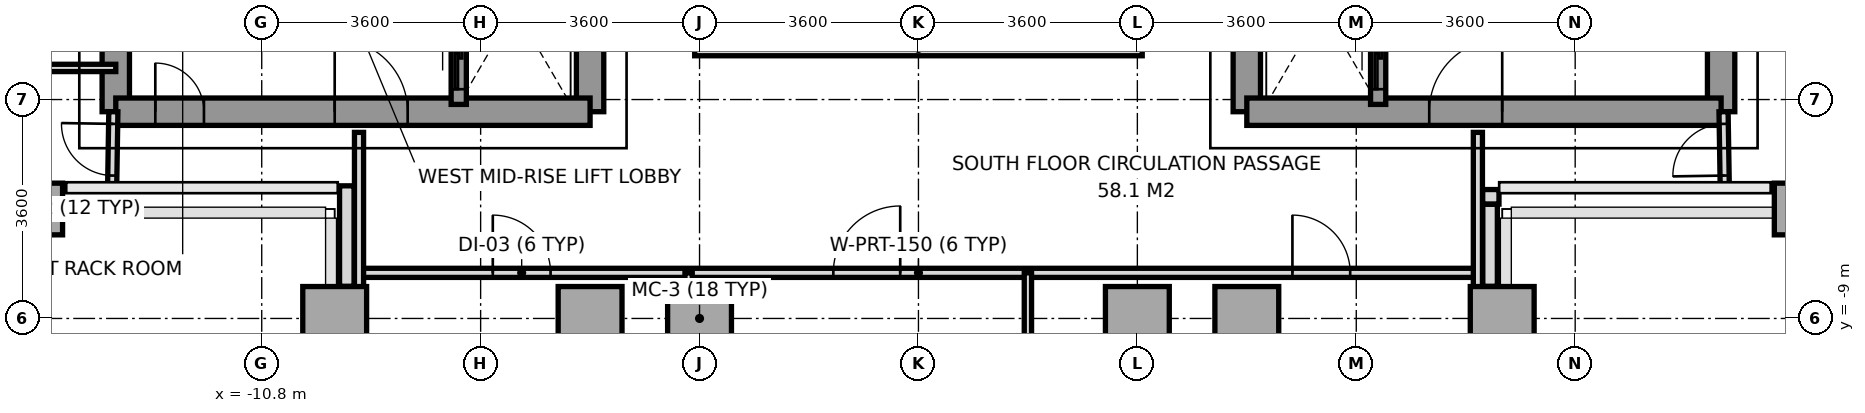
"""IFC4 building model, lengths in metres.
Left out: names, types, materials, properties, quantities, classifications, styles, units other than length and angle.
Written with IfcOpenShell. Run it as: python <this file> out.ifc"""

import sys

from ifc_helpers import new_model, si_unit, direction, frame, frame_2d, origin, origin_2d, place, context, subcontext, project, spatial, rectangle, extrude, source, transform, mapped, element, fill, save


model = new_model("IFC4")
c1 = context("Model", 3, precision=1e-05, world=origin(), true_north=direction((0.0, 1.0)))
c2 = subcontext(c1, "Body", "Model", "MODEL_VIEW")
j1 = project(units=[si_unit("LENGTHUNIT", "METRE"), si_unit("PLANEANGLEUNIT", "RADIAN")], contexts=[c1])
p1 = place(None, origin())
s1 = spatial("IfcSite", under=j1, at=p1, CompositionType="ELEMENT")
p2 = place(p1, origin())
s2 = spatial("IfcBuilding", under=s1, at=p2, CompositionType="ELEMENT")
p3 = place(p2, frame((0.0, 0.0, 144.8)))
s3 = spatial("IfcBuildingStorey", under=s2, at=p3, CompositionType="ELEMENT", Elevation=144.8)
m1 = source(origin(), c2, "Body", "SweptSolid", [
    extrude(rectangle(XDim=0.65, YDim=0.85, at=origin_2d()), origin(), (0.0, 0.0, 1.0), 3.2),
])
p4 = place(p3, frame((-14.4, -7.2, 0.0), z_axis=(0.0, 0.0, 1.0), x_axis=(1.0, 0.0, 0.0)))
e1 = element("IfcColumn", 1, at=p4, inside=s3, PredefinedType="COLUMN", context=c2, shape_type="MappedRepresentation", body=[
    mapped(m1, transform((0.0, 0.0, 0.0), x_axis=(1.0, 0.0, 0.0), y_axis=(0.0, 1.0, 0.0), z_axis=(0.0, 0.0, 1.0), scale=1.0)),
])
m2 = source(origin(), c2, "Body", "SweptSolid", [
    extrude(rectangle(XDim=1.05, YDim=1.05, at=origin_2d()), origin(), (0.0, 0.0, 1.0), 3.2),
])
for number, where, z_axis, x_axis in (
    (2, (-9.6, -9.0, 0.0), (0.0, 0.0, 1.0), (1.0, 0.0, 0.0)),
    (3, (-5.4, -9.0, 0.0), (0.0, 0.0, 1.0), (1.0, 0.0, 0.0)),
    (4, (-3.6, -9.0, 0.0), (0.0, 0.0, 1.0), (1.0, 0.0, 0.0)),
    (5, (3.6, -9.0, 0.0), (0.0, 0.0, 1.0), (1.0, 0.0, 0.0)),
    (6, (5.4, -9.0, 0.0), (0.0, 0.0, 1.0), (1.0, 0.0, 0.0)),
    (7, (9.6, -9.0, 0.0), (0.0, 0.0, 1.0), (1.0, 0.0, 0.0)),
):
    element("IfcColumn", number, at=place(p3, frame(where, z_axis=z_axis, x_axis=x_axis)), inside=s3, PredefinedType="COLUMN", context=c2, shape_type="MappedRepresentation", body=[
        mapped(m2, transform((0.0, 0.0, 0.0), x_axis=(1.0, 0.0, 0.0), y_axis=(0.0, 1.0, 0.0), z_axis=(0.0, 0.0, 1.0), scale=1.0)),
    ])
p5 = place(p3, frame((14.4, -7.2, 0.0), z_axis=(0.0, 0.0, 1.0), x_axis=(1.0, 0.0, 0.0)))
e8 = element("IfcColumn", 8, at=p5, inside=s3, PredefinedType="COLUMN", context=c2, shape_type="MappedRepresentation", body=[
    mapped(m1, transform((0.0, 0.0, 0.0), x_axis=(1.0, 0.0, 0.0), y_axis=(0.0, 1.0, 0.0), z_axis=(0.0, 0.0, 1.0), scale=1.0)),
])
p6 = place(p3, frame((9.547, -7.0, 0.0), z_axis=(0.0, 0.0, 1.0), x_axis=(-1.0, 0.0, 0.0)))
e9 = element("IfcWall", 9, at=p6, inside=s3, PredefinedType="PARAPET", context=c2, shape_type="SweptSolid", body=[
    extrude(rectangle(XDim=0.269, YDim=0.24, at=frame_2d((0.135, 0.0))), origin(), (0.0, 0.0, 1.0), 1.15),
])
p7 = place(p3, frame((9.4, -7.123, 0.0), z_axis=(0.0, 0.0, 1.0), x_axis=(0.0, -1.0, 0.0)))
e10 = element("IfcWall", 10, at=p7, inside=s3, PredefinedType="PARAPET", context=c2, shape_type="SweptSolid", body=[
    extrude(rectangle(XDim=1.349, YDim=0.24, at=frame_2d((0.674, 0.0))), origin(), (0.0, 0.0, 1.0), 1.15),
])
p8 = place(p3, frame((-9.4, -8.472, 0.0), z_axis=(0.0, 0.0, 1.0), x_axis=(0.0, 1.0, 0.0)))
e11 = element("IfcWall", 11, at=p8, inside=s3, PredefinedType="PARAPET", context=c2, shape_type="SweptSolid", body=[
    extrude(rectangle(XDim=1.653, YDim=0.24, at=frame_2d((0.827, 0.0))), origin(), (0.0, 0.0, 1.0), 1.15),
])
p9 = place(p3, frame((-13.2, -5.6, 0.0), z_axis=(0.0, 0.0, 1.0), x_axis=(0.0, 1.0, 0.0)))
e12 = element("IfcWall", 12, at=p9, inside=s3, PredefinedType="SHEAR", context=c2, shape_type="SweptSolid", body=[
    extrude(rectangle(XDim=11.2, YDim=0.45, at=frame_2d((5.6, 0.0))), origin(), (0.0, 0.0, 1.0), 3.2),
])
p10 = place(p3, frame((-5.4, -5.6, 0.0), z_axis=(0.0, 0.0, 1.0), x_axis=(0.0, 1.0, 0.0)))
e13 = element("IfcWall", 13, at=p10, inside=s3, PredefinedType="SHEAR", context=c2, shape_type="SweptSolid", body=[
    extrude(rectangle(XDim=12.5, YDim=0.45, at=frame_2d((6.25, 0.0))), origin(), (0.0, 0.0, 1.0), 3.2),
])
p11 = place(p10, frame((4.55, 0.0, 0.0)))
e14 = element("IfcOpeningElement", 14, at=p11, cuts=e13, PredefinedType="OPENING", context=c2, shape_type="SweptSolid", body=[
    extrude(rectangle(XDim=1.2, YDim=2.2, at=frame_2d((0.6, 1.1))), frame((0.0, 0.235, 0.0), z_axis=(0.0, -1.0, 0.0), x_axis=(1.0, 0.0, 0.0)), (0.0, 0.0, 1.0), 0.47),
])
p12 = place(p10, frame((6.86, 0.0, 0.0)))
e15 = element("IfcOpeningElement", 15, at=p12, cuts=e13, PredefinedType="OPENING", context=c2, shape_type="SweptSolid", body=[
    extrude(rectangle(XDim=0.8, YDim=2.1, at=frame_2d((0.4, 1.05))), frame((0.0, 0.235, 0.0), z_axis=(0.0, -1.0, 0.0), x_axis=(1.0, 0.0, 0.0)), (0.0, 0.0, 1.0), 0.47),
])
p13 = place(p3, frame((-13.2, -5.6, 0.0), z_axis=(0.0, 0.0, 1.0), x_axis=(1.0, 0.0, 0.0)))
e16 = element("IfcWall", 16, at=p13, inside=s3, PredefinedType="SHEAR", context=c2, shape_type="SweptSolid", body=[
    extrude(rectangle(XDim=7.8, YDim=0.45, at=frame_2d((3.9, 0.0))), origin(), (0.0, 0.0, 1.0), 3.2),
])
p14 = place(p13, frame((3.6, 0.0, 0.0)))
e17 = element("IfcOpeningElement", 17, at=p14, cuts=e16, PredefinedType="OPENING", context=c2, shape_type="SweptSolid", body=[
    extrude(rectangle(XDim=1.2, YDim=2.2, at=frame_2d((0.6, 1.1))), frame((0.0, 0.235, 0.0), z_axis=(0.0, -1.0, 0.0), x_axis=(1.0, 0.0, 0.0)), (0.0, 0.0, 1.0), 0.47),
])
p15 = place(p13, frame((0.65, 0.0, 0.0)))
e18 = element("IfcOpeningElement", 18, at=p15, cuts=e16, PredefinedType="OPENING", context=c2, shape_type="SweptSolid", body=[
    extrude(rectangle(XDim=0.8, YDim=2.1, at=frame_2d((0.4, 1.05))), frame((0.0, 0.235, 0.0), z_axis=(0.0, -1.0, 0.0), x_axis=(1.0, 0.0, 0.0)), (0.0, 0.0, 1.0), 0.47),
])
p16 = place(p3, frame((13.2, -5.6, 0.0), z_axis=(0.0, 0.0, 1.0), x_axis=(0.0, 1.0, 0.0)))
e19 = element("IfcWall", 19, at=p16, inside=s3, PredefinedType="SHEAR", context=c2, shape_type="SweptSolid", body=[
    extrude(rectangle(XDim=11.2, YDim=0.45, at=frame_2d((5.6, 0.0))), origin(), (0.0, 0.0, 1.0), 3.2),
])
p17 = place(p3, frame((5.4, -5.6, 0.0), z_axis=(0.0, 0.0, 1.0), x_axis=(0.0, 1.0, 0.0)))
e20 = element("IfcWall", 20, at=p17, inside=s3, PredefinedType="SHEAR", context=c2, shape_type="SweptSolid", body=[
    extrude(rectangle(XDim=12.5, YDim=0.45, at=frame_2d((6.25, 0.0))), origin(), (0.0, 0.0, 1.0), 3.2),
])
p18 = place(p17, frame((4.55, 0.0, 0.0)))
e21 = element("IfcOpeningElement", 21, at=p18, cuts=e20, PredefinedType="OPENING", context=c2, shape_type="SweptSolid", body=[
    extrude(rectangle(XDim=1.2, YDim=2.2, at=frame_2d((0.6, 1.1))), frame((0.0, 0.235, 0.0), z_axis=(0.0, -1.0, 0.0), x_axis=(1.0, 0.0, 0.0)), (0.0, 0.0, 1.0), 0.47),
])
p19 = place(p17, frame((6.86, 0.0, 0.0)))
e22 = element("IfcOpeningElement", 22, at=p19, cuts=e20, PredefinedType="OPENING", context=c2, shape_type="SweptSolid", body=[
    extrude(rectangle(XDim=0.8, YDim=2.1, at=frame_2d((0.4, 1.05))), frame((0.0, 0.235, 0.0), z_axis=(0.0, -1.0, 0.0), x_axis=(1.0, 0.0, 0.0)), (0.0, 0.0, 1.0), 0.47),
])
p20 = place(p3, frame((5.4, -5.6, 0.0), z_axis=(0.0, 0.0, 1.0), x_axis=(1.0, 0.0, 0.0)))
e23 = element("IfcWall", 23, at=p20, inside=s3, PredefinedType="SHEAR", context=c2, shape_type="SweptSolid", body=[
    extrude(rectangle(XDim=7.8, YDim=0.45, at=frame_2d((3.9, 0.0))), origin(), (0.0, 0.0, 1.0), 3.2),
])
p21 = place(p20, frame((3.0, 0.0, 0.0)))
e24 = element("IfcOpeningElement", 24, at=p21, cuts=e23, PredefinedType="OPENING", context=c2, shape_type="SweptSolid", body=[
    extrude(rectangle(XDim=1.2, YDim=2.2, at=frame_2d((0.6, 1.1))), frame((0.0, 0.235, 0.0), z_axis=(0.0, -1.0, 0.0), x_axis=(1.0, 0.0, 0.0)), (0.0, 0.0, 1.0), 0.47),
])
p22 = place(p3, frame((-7.56, -5.48, 0.0), z_axis=(0.0, 0.0, 1.0), x_axis=(0.0, 1.0, 0.0)))
e25 = element("IfcWall", 25, at=p22, inside=s3, PredefinedType="SOLIDWALL", context=c2, shape_type="SweptSolid", body=[
    extrude(rectangle(XDim=1.6, YDim=0.25, at=frame_2d((0.8, 0.0))), origin(), (0.0, 0.0, 1.0), 3.2),
])
p23 = place(p22, frame((0.25, 0.0, 0.0)))
e26 = element("IfcOpeningElement", 26, at=p23, cuts=e25, PredefinedType="OPENING", context=c2, shape_type="SweptSolid", body=[
    extrude(rectangle(XDim=1.1, YDim=2.2, at=frame_2d((0.55, 1.1))), frame((0.0, 0.135, 0.0), z_axis=(0.0, -1.0, 0.0), x_axis=(1.0, 0.0, 0.0)), (0.0, 0.0, 1.0), 0.27),
])
p24 = place(p3, frame((7.56, -5.48, 0.0), z_axis=(0.0, 0.0, 1.0), x_axis=(0.0, 1.0, 0.0)))
e27 = element("IfcWall", 27, at=p24, inside=s3, PredefinedType="SOLIDWALL", context=c2, shape_type="SweptSolid", body=[
    extrude(rectangle(XDim=1.6, YDim=0.25, at=frame_2d((0.8, 0.0))), origin(), (0.0, 0.0, 1.0), 3.2),
])
p25 = place(p24, frame((0.25, 0.0, 0.0)))
e28 = element("IfcOpeningElement", 28, at=p25, cuts=e27, PredefinedType="OPENING", context=c2, shape_type="SweptSolid", body=[
    extrude(rectangle(XDim=1.1, YDim=2.2, at=frame_2d((0.55, 1.1))), frame((0.0, 0.135, 0.0), z_axis=(0.0, -1.0, 0.0), x_axis=(1.0, 0.0, 0.0)), (0.0, 0.0, 1.0), 0.27),
])
p26 = place(p3, frame((-9.2, -8.25, 0.0), z_axis=(0.0, 0.0, 1.0), x_axis=(1.0, 0.0, 0.0)))
e29 = element("IfcWall", 29, at=p26, inside=s3, PredefinedType="PARTITIONING", context=c2, shape_type="SweptSolid", body=[
    extrude(rectangle(XDim=18.4, YDim=0.15, at=frame_2d((9.2, 0.0))), origin(), (0.0, 0.0, 1.0), 2.76),
])
p27 = place(p26, frame((2.2, 0.0, 0.0)))
e30 = element("IfcOpeningElement", 30, at=p27, cuts=e29, PredefinedType="OPENING", context=c2, shape_type="SweptSolid", body=[
    extrude(rectangle(XDim=0.95, YDim=2.15, at=frame_2d((0.475, 1.075))), frame((0.0, 0.085, 0.0), z_axis=(0.0, -1.0, 0.0), x_axis=(1.0, 0.0, 0.0)), (0.0, 0.0, 1.0), 0.17),
])
p28 = place(p26, frame((7.8, 0.0, 0.0)))
e31 = element("IfcOpeningElement", 31, at=p28, cuts=e29, PredefinedType="OPENING", context=c2, shape_type="SweptSolid", body=[
    extrude(rectangle(XDim=1.1, YDim=2.2, at=frame_2d((0.55, 1.1))), frame((0.0, 0.085, 0.0), z_axis=(0.0, -1.0, 0.0), x_axis=(1.0, 0.0, 0.0)), (0.0, 0.0, 1.0), 0.17),
])
p29 = place(p26, frame((15.35, 0.0, 0.0)))
e32 = element("IfcOpeningElement", 32, at=p29, cuts=e29, PredefinedType="OPENING", context=c2, shape_type="SweptSolid", body=[
    extrude(rectangle(XDim=0.95, YDim=2.15, at=frame_2d((0.475, 1.075))), frame((0.0, 0.085, 0.0), z_axis=(0.0, -1.0, 0.0), x_axis=(1.0, 0.0, 0.0)), (0.0, 0.0, 1.0), 0.17),
])
for number, where, z_axis, x_axis in (
    (33, (-9.2, -15.68, 0.0), (0.0, 0.0, 1.0), (0.0, 1.0, 0.0)),
    (34, (9.2, -15.68, 0.0), (0.0, 0.0, 1.0), (0.0, 1.0, 0.0)),
):
    element("IfcWall", number, at=place(p3, frame(where, z_axis=z_axis, x_axis=x_axis)), inside=s3, PredefinedType="PARTITIONING", context=c2, shape_type="SweptSolid", body=[
        extrude(rectangle(XDim=9.74, YDim=0.15, at=frame_2d((4.87, 0.0))), origin(), (0.0, 0.0, 1.0), 2.7),
    ])
for number, where, z_axis, x_axis in (
    (35, (-3.78, -24.65, 0.0), (0.0, 0.0, 1.0), (0.0, 1.0, 0.0)),
    (36, (1.8, -24.65, 0.0), (0.0, 0.0, 1.0), (0.0, 1.0, 0.0)),
):
    element("IfcWall", number, at=place(p3, frame(where, z_axis=z_axis, x_axis=x_axis)), inside=s3, PredefinedType="PARTITIONING", context=c2, shape_type="SweptSolid", body=[
        extrude(rectangle(XDim=16.4, YDim=0.12, at=frame_2d((8.2, 0.0))), origin(), (0.0, 0.0, 1.0), 2.7),
    ])
p30 = place(p3, frame((-13.26, -6.85, 0.0), z_axis=(0.0, 0.0, 1.0), x_axis=(0.016013571389, 0.999871774545, 0.0)))
e37 = element("IfcWall", 37, at=p30, inside=s3, PredefinedType="PARTITIONING", context=c2, shape_type="SweptSolid", body=[
    extrude(rectangle(XDim=1.25, YDim=0.15, at=frame_2d((0.625, 0.0))), origin(), (0.0, 0.0, 1.0), 3.2),
])
p31 = place(p30, frame((0.2, 0.0, 0.0)))
e38 = element("IfcOpeningElement", 38, at=p31, cuts=e37, PredefinedType="OPENING", context=c2, shape_type="SweptSolid", body=[
    extrude(rectangle(XDim=0.85, YDim=2.1, at=frame_2d((0.425, 1.05))), frame((0.0, 0.085, 0.0), z_axis=(0.0, -1.0, 0.0), x_axis=(1.0, 0.0, 0.0)), (0.0, 0.0, 1.0), 0.17),
])
p32 = place(p3, frame((-19.17, -4.88, 0.0), z_axis=(0.0, 0.0, 1.0), x_axis=(1.0, 0.0, 0.0)))
e39 = element("IfcWall", 39, at=p32, inside=s3, PredefinedType="PARTITIONING", context=c2, shape_type="SweptSolid", body=[
    extrude(rectangle(XDim=5.97, YDim=0.12, at=frame_2d((2.985, 0.0))), origin(), (0.0, 0.0, 1.0), 2.76),
])
p33 = place(p32, frame((1.45, 0.0, 0.0)))
e40 = element("IfcOpeningElement", 40, at=p33, cuts=e39, PredefinedType="OPENING", context=c2, shape_type="SweptSolid", body=[
    extrude(rectangle(XDim=0.95, YDim=2.15, at=frame_2d((0.475, 1.075))), frame((0.0, 0.07, 0.0), z_axis=(0.0, -1.0, 0.0), x_axis=(1.0, 0.0, 0.0)), (0.0, 0.0, 1.0), 0.14),
])
p34 = place(p3, frame((13.26, -6.85, 0.0), z_axis=(0.0, 0.0, 1.0), x_axis=(-0.016013571389, 0.999871774545, 0.0)))
e41 = element("IfcWall", 41, at=p34, inside=s3, PredefinedType="PARTITIONING", context=c2, shape_type="SweptSolid", body=[
    extrude(rectangle(XDim=1.25, YDim=0.15, at=frame_2d((0.625, 0.0))), origin(), (0.0, 0.0, 1.0), 3.2),
])
p35 = place(p34, frame((0.2, 0.0, 0.0)))
e42 = element("IfcOpeningElement", 42, at=p35, cuts=e41, PredefinedType="OPENING", context=c2, shape_type="SweptSolid", body=[
    extrude(rectangle(XDim=0.85, YDim=2.1, at=frame_2d((0.425, 1.05))), frame((0.0, 0.085, 0.0), z_axis=(0.0, -1.0, 0.0), x_axis=(1.0, 0.0, 0.0)), (0.0, 0.0, 1.0), 0.17),
])
p36 = place(p3, frame((-3.68, -4.56, 0.0), z_axis=(0.0, 0.0, 1.0), x_axis=(1.0, 0.0, 0.0)))
e43 = element("IfcWall", 43, at=p36, inside=s3, PredefinedType="PARAPET", context=c2, shape_type="SweptSolid", body=[
    extrude(rectangle(XDim=7.36, YDim=0.24, at=frame_2d((3.68, 0.0))), origin(), (0.0, 0.0, 1.0), 1.15),
])
m3 = source(origin(), c2, "Body", "SweptSolid", [
    extrude(rectangle(XDim=1.2, YDim=2.2, at=frame_2d((0.6, 1.1))), frame((0.0, 0.025, 0.0), z_axis=(0.0, -1.0, 0.0), x_axis=(1.0, 0.0, 0.0)), (0.0, 0.0, 1.0), 0.05),
])
p37 = place(p14, origin())
e44 = element("IfcDoor", 44, at=p37, inside=s3, OperationType="SINGLE_SWING_LEFT", PredefinedType="DOOR", context=c2, shape_type="MappedRepresentation", body=[
    mapped(m3, transform((0.0, 0.0, 0.0), x_axis=(1.0, 0.0, 0.0), y_axis=(0.0, 1.0, 0.0), z_axis=(0.0, 0.0, 1.0), scale=1.0)),
])
fill(e17, e44)
p38 = place(p21, origin())
e45 = element("IfcDoor", 45, at=p38, inside=s3, OperationType="SINGLE_SWING_RIGHT", PredefinedType="DOOR", context=c2, shape_type="MappedRepresentation", body=[
    mapped(m3, transform((0.0, 0.0, 0.0), x_axis=(1.0, 0.0, 0.0), y_axis=(0.0, 1.0, 0.0), z_axis=(0.0, 0.0, 1.0), scale=1.0)),
])
fill(e24, e45)
m4 = source(origin(), c2, "Body", "SweptSolid", [
    extrude(rectangle(XDim=0.8, YDim=2.1, at=frame_2d((0.4, 1.05))), frame((0.0, 0.025, 0.0), z_axis=(0.0, -1.0, 0.0), x_axis=(1.0, 0.0, 0.0)), (0.0, 0.0, 1.0), 0.05),
])
p39 = place(p15, origin())
e46 = element("IfcDoor", 46, at=p39, inside=s3, OperationType="SINGLE_SWING_LEFT", PredefinedType="DOOR", context=c2, shape_type="MappedRepresentation", body=[
    mapped(m4, transform((0.0, 0.0, 0.0), x_axis=(1.0, 0.0, 0.0), y_axis=(0.0, 1.0, 0.0), z_axis=(0.0, 0.0, 1.0), scale=1.0)),
])
fill(e18, e46)
m5 = source(origin(), c2, "Body", "SweptSolid", [
    extrude(rectangle(XDim=1.1, YDim=2.2, at=frame_2d((0.55, 1.1))), frame((0.0, 0.025, 0.0), z_axis=(0.0, -1.0, 0.0), x_axis=(1.0, 0.0, 0.0)), (0.0, 0.0, 1.0), 0.05),
])
p40 = place(p23, origin())
e47 = element("IfcDoor", 47, at=p40, inside=s3, OperationType="SLIDING_TO_LEFT", PredefinedType="DOOR", context=c2, shape_type="MappedRepresentation", body=[
    mapped(m5, transform((0.0, 0.0, 0.0), x_axis=(1.0, 0.0, 0.0), y_axis=(0.0, 1.0, 0.0), z_axis=(0.0, 0.0, 1.0), scale=1.0)),
])
fill(e26, e47)
p41 = place(p25, origin())
e48 = element("IfcDoor", 48, at=p41, inside=s3, OperationType="SLIDING_TO_LEFT", PredefinedType="DOOR", context=c2, shape_type="MappedRepresentation", body=[
    mapped(m5, transform((0.0, 0.0, 0.0), x_axis=(1.0, 0.0, 0.0), y_axis=(0.0, 1.0, 0.0), z_axis=(0.0, 0.0, 1.0), scale=1.0)),
])
fill(e28, e48)
m6 = source(origin(), c2, "Body", "SweptSolid", [
    extrude(rectangle(XDim=0.95, YDim=2.15, at=frame_2d((0.475, 1.075))), frame((0.0, 0.025, 0.0), z_axis=(0.0, -1.0, 0.0), x_axis=(1.0, 0.0, 0.0)), (0.0, 0.0, 1.0), 0.05),
])
p42 = place(p27, origin())
e49 = element("IfcDoor", 49, at=p42, inside=s3, OperationType="SINGLE_SWING_LEFT", PredefinedType="DOOR", context=c2, shape_type="MappedRepresentation", body=[
    mapped(m6, transform((0.0, 0.0, 0.0), x_axis=(1.0, 0.0, 0.0), y_axis=(0.0, 1.0, 0.0), z_axis=(0.0, 0.0, 1.0), scale=1.0)),
])
fill(e30, e49)
p43 = place(p28, origin())
e50 = element("IfcDoor", 50, at=p43, inside=s3, OperationType="SINGLE_SWING_RIGHT", PredefinedType="DOOR", context=c2, shape_type="MappedRepresentation", body=[
    mapped(m5, transform((0.0, 0.0, 0.0), x_axis=(1.0, 0.0, 0.0), y_axis=(0.0, 1.0, 0.0), z_axis=(0.0, 0.0, 1.0), scale=1.0)),
])
fill(e31, e50)
p44 = place(p29, origin())
e51 = element("IfcDoor", 51, at=p44, inside=s3, OperationType="SINGLE_SWING_LEFT", PredefinedType="DOOR", context=c2, shape_type="MappedRepresentation", body=[
    mapped(m6, transform((0.0, 0.0, 0.0), x_axis=(1.0, 0.0, 0.0), y_axis=(0.0, 1.0, 0.0), z_axis=(0.0, 0.0, 1.0), scale=1.0)),
])
fill(e32, e51)
m7 = source(origin(), c2, "Body", "SweptSolid", [
    extrude(rectangle(XDim=0.85, YDim=2.1, at=frame_2d((0.425, 1.05))), frame((0.0, 0.025, 0.0), z_axis=(0.0, -1.0, 0.0), x_axis=(1.0, 0.0, 0.0)), (0.0, 0.0, 1.0), 0.05),
])
p45 = place(p31, origin())
e52 = element("IfcDoor", 52, at=p45, inside=s3, OperationType="SINGLE_SWING_RIGHT", PredefinedType="DOOR", context=c2, shape_type="MappedRepresentation", body=[
    mapped(m7, transform((0.0, 0.0, 0.0), x_axis=(1.0, 0.0, 0.0), y_axis=(0.0, 1.0, 0.0), z_axis=(0.0, 0.0, 1.0), scale=1.0)),
])
fill(e38, e52)
p46 = place(p35, origin())
e53 = element("IfcDoor", 53, at=p46, inside=s3, OperationType="SINGLE_SWING_LEFT", PredefinedType="DOOR", context=c2, shape_type="MappedRepresentation", body=[
    mapped(m7, transform((0.0, 0.0, 0.0), x_axis=(1.0, 0.0, 0.0), y_axis=(0.0, 1.0, 0.0), z_axis=(0.0, 0.0, 1.0), scale=1.0)),
])
fill(e42, e53)
save(model, sys.argv[1])
